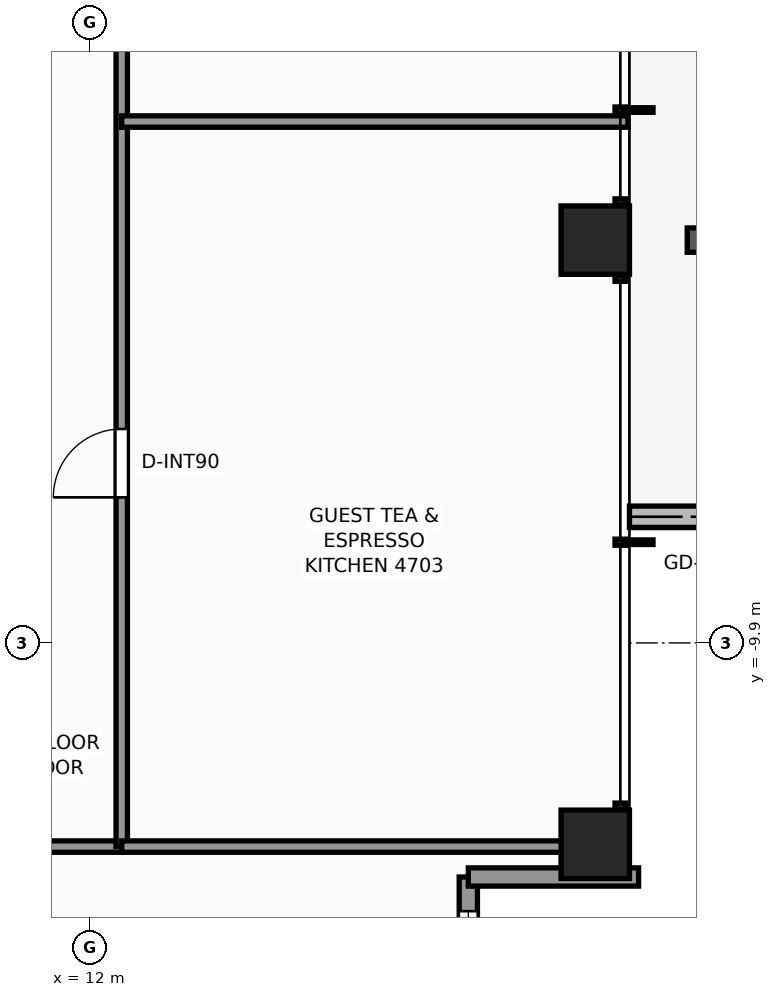
"""IFC4 building model, lengths in metres.
Left out: names, types, materials, properties, quantities, classifications, styles, units other than length and angle.
Written with IfcOpenShell. Run it as: python <this file> out.ifc"""

import sys

from ifc_helpers import new_model, si_unit, direction, frame, frame_2d, origin, origin_2d, place, context, subcontext, project, spatial, rectangle, extrude, element, fill, save


model = new_model("IFC4")
c1 = context("Model", 3, precision=1e-05, world=origin(), true_north=direction((0.0, 1.0)))
c2 = subcontext(c1, "Body", "Model", "MODEL_VIEW")
j1 = project(units=[si_unit("LENGTHUNIT", "METRE"), si_unit("PLANEANGLEUNIT", "RADIAN")], contexts=[c1])
p1 = place(None, origin())
s1 = spatial("IfcSite", under=j1, at=p1, CompositionType="ELEMENT")
p2 = place(p1, origin())
s2 = spatial("IfcBuilding", under=s1, at=p2, CompositionType="ELEMENT")
p3 = place(p2, frame((0.0, 0.0, 163.5)))
s3 = spatial("IfcBuildingStorey", under=s2, at=p3, CompositionType="ELEMENT", Elevation=163.5)
for number, where, z_axis, x_axis in (
    (1, (18.65, -12.55, 0.0), (0.0, 0.0, 1.0), (1.0, 0.0, 0.0)),
    (2, (18.65, -4.6, 0.0), (0.0, 0.0, 1.0), (1.0, 0.0, 0.0)),
):
    element("IfcColumn", number, at=place(p3, frame(where, z_axis=z_axis, x_axis=x_axis)), inside=s3, PredefinedType="COLUMN", context=c2, shape_type="SweptSolid", body=[
        extrude(rectangle(XDim=0.9, YDim=0.9, at=origin_2d()), origin(), (0.0, 0.0, 1.0), 3.3),
    ])
p4 = place(p3, frame((19.1, -8.24, -0.02), z_axis=(0.0, 0.0, 1.0), x_axis=(1.0, 0.0, 0.0)))
e3 = element("IfcWall", 3, at=p4, inside=s3, PredefinedType="PARAPET", context=c2, shape_type="SweptSolid", body=[
    extrude(rectangle(XDim=1.705, YDim=0.28, at=frame_2d((0.853, 0.0))), origin(), (0.0, 0.0, 1.0), 0.42),
])
p5 = place(p3, frame((16.98, -12.98, 0.0), z_axis=(0.0, 0.0, 1.0), x_axis=(0.0, -1.0, 0.0)))
e4 = element("IfcWall", 4, at=p5, inside=s3, PredefinedType="STANDARD", context=c2, shape_type="SweptSolid", body=[
    extrude(rectangle(XDim=2.24, YDim=0.24, at=frame_2d((1.12, 0.0))), origin(), (0.0, 0.0, 1.0), 2.483),
])
p6 = place(p5, frame((0.45, 0.0, 0.65)))
e5 = element("IfcOpeningElement", 5, at=p6, cuts=e4, PredefinedType="OPENING", context=c2, shape_type="SweptSolid", body=[
    extrude(rectangle(XDim=1.1, YDim=1.45, at=frame_2d((0.55, 0.725))), frame((0.0, 0.13, 0.0), z_axis=(0.0, -1.0, 0.0), x_axis=(1.0, 0.0, 0.0)), (0.0, 0.0, 1.0), 0.26),
])
p7 = place(p3, frame((19.22, -12.98, 0.0), z_axis=(0.0, 0.0, 1.0), x_axis=(-1.0, 0.0, 0.0)))
e6 = element("IfcWall", 6, at=p7, inside=s3, PredefinedType="STANDARD", context=c2, shape_type="SweptSolid", body=[
    extrude(rectangle(XDim=2.24, YDim=0.24, at=frame_2d((1.12, 0.0))), origin(), (0.0, 0.0, 1.0), 2.483),
])
p8 = place(p3, frame((-12.42, -12.58, 0.0), z_axis=(0.0, 0.0, 1.0), x_axis=(1.0, 0.0, 0.0)))
e7 = element("IfcWall", 7, at=p8, inside=s3, PredefinedType="PARTITIONING", context=c2, shape_type="SweptSolid", body=[
    extrude(rectangle(XDim=24.84, YDim=0.15, at=frame_2d((12.42, 0.0))), origin(), (0.0, 0.0, 1.0), 2.389),
])
p9 = place(p8, frame((4.435, 0.0, 0.0)))
e8 = element("IfcOpeningElement", 8, at=p9, cuts=e7, PredefinedType="OPENING", context=c2, shape_type="SweptSolid", body=[
    extrude(rectangle(XDim=0.9, YDim=2.06, at=frame_2d((0.45, 1.03))), frame((0.0, 0.085, 0.0), z_axis=(0.0, -1.0, 0.0), x_axis=(1.0, 0.0, 0.0)), (0.0, 0.0, 1.0), 0.17),
])
p10 = place(p8, frame((19.505, 0.0, 0.0)))
e9 = element("IfcOpeningElement", 9, at=p10, cuts=e7, PredefinedType="OPENING", context=c2, shape_type="SweptSolid", body=[
    extrude(rectangle(XDim=0.9, YDim=2.06, at=frame_2d((0.45, 1.03))), frame((0.0, 0.085, 0.0), z_axis=(0.0, -1.0, 0.0), x_axis=(1.0, 0.0, 0.0)), (0.0, 0.0, 1.0), 0.17),
])
p11 = place(p3, frame((12.42, -12.58, 0.0), z_axis=(0.0, 0.0, 1.0), x_axis=(0.0, 1.0, 0.0)))
e10 = element("IfcWall", 10, at=p11, inside=s3, PredefinedType="PARTITIONING", context=c2, shape_type="SweptSolid", body=[
    extrude(rectangle(XDim=24.84, YDim=0.15, at=frame_2d((12.42, 0.0))), origin(), (0.0, 0.0, 1.0), 2.389),
])
p12 = place(p11, frame((4.595, 0.0, 0.0)))
e11 = element("IfcOpeningElement", 11, at=p12, cuts=e10, PredefinedType="OPENING", context=c2, shape_type="SweptSolid", body=[
    extrude(rectangle(XDim=0.9, YDim=2.06, at=frame_2d((0.45, 1.03))), frame((0.0, 0.085, 0.0), z_axis=(0.0, -1.0, 0.0), x_axis=(1.0, 0.0, 0.0)), (0.0, 0.0, 1.0), 0.17),
])
p13 = place(p11, frame((14.16, 0.0, 0.0)))
e12 = element("IfcOpeningElement", 12, at=p13, cuts=e10, PredefinedType="OPENING", context=c2, shape_type="SweptSolid", body=[
    extrude(rectangle(XDim=0.9, YDim=2.06, at=frame_2d((0.45, 1.03))), frame((0.0, 0.085, 0.0), z_axis=(0.0, -1.0, 0.0), x_axis=(1.0, 0.0, 0.0)), (0.0, 0.0, 1.0), 0.17),
])
p14 = place(p11, frame((18.919, 0.0, 0.0)))
e13 = element("IfcOpeningElement", 13, at=p14, cuts=e10, PredefinedType="OPENING", context=c2, shape_type="SweptSolid", body=[
    extrude(rectangle(XDim=0.9, YDim=2.06, at=frame_2d((0.45, 1.03))), frame((0.0, 0.085, 0.0), z_axis=(0.0, -1.0, 0.0), x_axis=(1.0, 0.0, 0.0)), (0.0, 0.0, 1.0), 0.17),
])
p15 = place(p11, frame((21.254, 0.0, 0.0)))
e14 = element("IfcOpeningElement", 14, at=p15, cuts=e10, PredefinedType="OPENING", context=c2, shape_type="SweptSolid", body=[
    extrude(rectangle(XDim=0.9, YDim=2.06, at=frame_2d((0.45, 1.03))), frame((0.0, 0.085, 0.0), z_axis=(0.0, -1.0, 0.0), x_axis=(1.0, 0.0, 0.0)), (0.0, 0.0, 1.0), 0.17),
])
p16 = place(p3, frame((12.42, -12.58, 0.0), z_axis=(0.0, 0.0, 1.0), x_axis=(1.0, 0.0, 0.0)))
e15 = element("IfcWall", 15, at=p16, inside=s3, PredefinedType="PARTITIONING", context=c2, shape_type="SweptSolid", body=[
    extrude(rectangle(XDim=6.66, YDim=0.15, at=frame_2d((3.33, 0.0))), origin(), (0.0, 0.0, 1.0), 2.389),
])
p17 = place(p3, frame((12.42, -3.04, 0.0), z_axis=(0.0, 0.0, 1.0), x_axis=(1.0, 0.0, 0.0)))
e16 = element("IfcWall", 16, at=p17, inside=s3, PredefinedType="PARTITIONING", context=c2, shape_type="SweptSolid", body=[
    extrude(rectangle(XDim=6.66, YDim=0.15, at=frame_2d((3.33, 0.0))), origin(), (0.0, 0.0, 1.0), 2.473),
])
p18 = place(p6, origin())
e17 = element("IfcWindow", 17, at=p18, inside=s3, PartitioningType="SINGLE_PANEL", PredefinedType="WINDOW", context=c2, shape_type="SweptSolid", body=[
    extrude(rectangle(XDim=1.1, YDim=1.45, at=frame_2d((0.55, 0.725))), frame((0.0, 0.03, 0.0), z_axis=(0.0, -1.0, 0.0), x_axis=(1.0, 0.0, 0.0)), (0.0, 0.0, 1.0), 0.06),
])
fill(e5, e17)
p19 = place(p12, origin())
e18 = element("IfcDoor", 18, at=p19, inside=s3, OperationType="SINGLE_SWING_LEFT", PredefinedType="DOOR", context=c2, shape_type="SweptSolid", body=[
    extrude(rectangle(XDim=0.9, YDim=2.06, at=frame_2d((0.45, 1.03))), frame((0.0, 0.025, 0.0), z_axis=(0.0, -1.0, 0.0), x_axis=(1.0, 0.0, 0.0)), (0.0, 0.0, 1.0), 0.05),
])
fill(e11, e18)
save(model, sys.argv[1])
